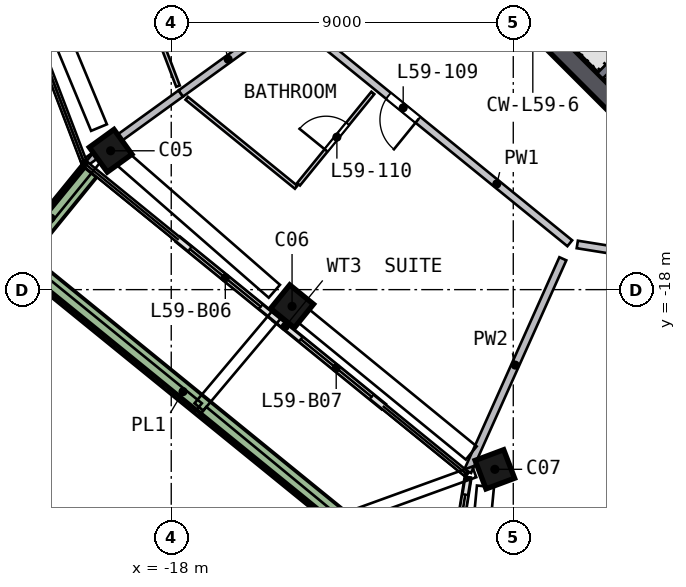
"""IFC4 building model, lengths in metres.
Left out: names, types, materials, properties, quantities, classifications, styles, units other than length and angle.
Written with IfcOpenShell. Run it as: python <this file> out.ifc"""

import sys

from ifc_helpers import new_model, si_unit, direction, frame, frame_2d, origin, origin_2d, place, context, subcontext, project, spatial, rectangle, extrude, element, fill, save


model = new_model("IFC4")
c1 = context("Model", 3, precision=1e-05, world=origin(), true_north=direction((0.0, 1.0)))
c2 = subcontext(c1, "Body", "Model", "MODEL_VIEW")
j1 = project(units=[si_unit("LENGTHUNIT", "METRE"), si_unit("PLANEANGLEUNIT", "RADIAN")], contexts=[c1])
p1 = place(None, origin())
s1 = spatial("IfcSite", under=j1, at=p1, CompositionType="ELEMENT")
p2 = place(p1, origin())
s2 = spatial("IfcBuilding", under=s1, at=p2, CompositionType="ELEMENT")
p3 = place(p2, frame((0.0, 0.0, 241.0)))
s3 = spatial("IfcBuildingStorey", under=s2, at=p3, CompositionType="ELEMENT", Elevation=241.0)
p4 = place(p3, frame((-19.677, -14.234, 0.0), z_axis=(0.068496241, -0.092975475, 0.993309532), x_axis=(-0.582352668, 0.804692577, 0.115478247)))
e1 = element("IfcColumn", 1, at=p4, inside=s3, PredefinedType="COLUMN", context=c2, shape_type="SweptSolid", body=[
    extrude(rectangle(XDim=0.8, YDim=0.8, at=origin_2d()), origin(), (0.0, 0.0, 1.0), 3.211),
])
p5 = place(p3, frame((-14.927, -18.355, 0.0), z_axis=(0.087836342, -0.070269074, 0.993653377), x_axis=(0.770618179, -0.627292241, -0.112481404)))
e2 = element("IfcColumn", 2, at=p5, inside=s3, PredefinedType="COLUMN", context=c2, shape_type="SweptSolid", body=[
    extrude(rectangle(XDim=0.8, YDim=0.8, at=origin_2d()), origin(), (0.0, 0.0, 1.0), 3.21),
])
p6 = place(p3, frame((-9.615, -22.675, 0.0), z_axis=(0.108159867, -0.044768912, 0.993124961), x_axis=(-0.349087537, 0.933659879, 0.080106937)))
e3 = element("IfcColumn", 3, at=p6, inside=s3, PredefinedType="COLUMN", context=c2, shape_type="SweptSolid", body=[
    extrude(rectangle(XDim=0.8, YDim=0.8, at=origin_2d()), origin(), (0.0, 0.0, 1.0), 3.212),
])
p7 = place(p3, frame((-13.823, -5.622, 0.0), z_axis=(0.0, 0.0, 1.0), x_axis=(0.707106781, -0.707106781, 0.0)))
e4 = element("IfcWall", 4, at=p7, inside=s3, PredefinedType="SHEAR", context=c2, shape_type="SweptSolid", body=[
    extrude(rectangle(XDim=11.598, YDim=0.5, at=frame_2d((5.799, 0.0))), origin(), (0.0, 0.0, 1.0), 3.5),
])
p8 = place(p7, frame((2.099, 0.0, 0.0)))
e5 = element("IfcOpeningElement", 5, at=p8, cuts=e4, PredefinedType="OPENING", context=c2, shape_type="SweptSolid", body=[
    extrude(rectangle(XDim=1.2, YDim=2.1, at=frame_2d((0.6, 1.05))), frame((0.0, 0.26, 0.0), z_axis=(0.0, -1.0, 0.0), x_axis=(1.0, 0.0, 0.0)), (0.0, 0.0, 1.0), 0.52),
])
p9 = place(p3, frame((-17.819, -16.68, 0.0), z_axis=(0.0, 0.0, 1.0), x_axis=(0.775849163, -0.630918438, 0.0)))
e6 = element("IfcWall", 6, at=p9, inside=s3, PredefinedType="SOLIDWALL", context=c2, shape_type="SweptSolid", body=[
    extrude(rectangle(XDim=3.3, YDim=0.15, at=frame_2d((1.65, 0.0))), origin(), (0.0, 0.0, 1.0), 2.525),
])
p10 = place(p9, frame((0.4, 0.0, 0.0)))
e7 = element("IfcOpeningElement", 7, at=p10, cuts=e6, PredefinedType="OPENING", context=c2, shape_type="SweptSolid", body=[
    extrude(rectangle(XDim=2.4, YDim=2.4, at=frame_2d((1.2, 1.2))), frame((0.0, 0.085, 0.0), z_axis=(0.0, -1.0, 0.0), x_axis=(1.0, 0.0, 0.0)), (0.0, 0.0, 1.0), 0.17),
])
p11 = place(p3, frame((-15.258, -18.762, 0.0), z_axis=(0.0, 0.0, 1.0), x_axis=(0.775807944, -0.630969122, 0.0)))
e8 = element("IfcWall", 8, at=p11, inside=s3, PredefinedType="SOLIDWALL", context=c2, shape_type="SweptSolid", body=[
    extrude(rectangle(XDim=3.661, YDim=0.15, at=frame_2d((1.831, 0.0))), origin(), (0.0, 0.0, 1.0), 2.525),
])
p12 = place(p11, frame((0.861, 0.0, 0.0)))
e9 = element("IfcOpeningElement", 9, at=p12, cuts=e8, PredefinedType="OPENING", context=c2, shape_type="SweptSolid", body=[
    extrude(rectangle(XDim=2.4, YDim=2.4, at=frame_2d((1.2, 1.2))), frame((0.0, 0.085, 0.0), z_axis=(0.0, -1.0, 0.0), x_axis=(1.0, 0.0, 0.0)), (0.0, 0.0, 1.0), 0.17),
])
p13 = place(p3, frame((-10.2, -23.002, 0.0), z_axis=(0.0, 0.0, 1.0), x_axis=(-0.158469573, -0.987363861, 0.0)))
e10 = element("IfcWall", 10, at=p13, inside=s3, PredefinedType="SOLIDWALL", context=c2, shape_type="SweptSolid", body=[
    extrude(rectangle(XDim=3.2, YDim=0.15, at=frame_2d((1.6, 0.0))), origin(), (0.0, 0.0, 1.0), 2.525),
])
p14 = place(p13, frame((0.4, 0.0, 0.0)))
e11 = element("IfcOpeningElement", 11, at=p14, cuts=e10, PredefinedType="OPENING", context=c2, shape_type="SweptSolid", body=[
    extrude(rectangle(XDim=2.4, YDim=2.4, at=frame_2d((1.2, 1.2))), frame((0.0, 0.085, 0.0), z_axis=(0.0, -1.0, 0.0), x_axis=(1.0, 0.0, 0.0)), (0.0, 0.0, 1.0), 0.17),
])
p15 = place(p3, frame((-20.155, -14.878, 0.0), z_axis=(0.0, 0.0, 1.0), x_axis=(-0.630957466, -0.775817424, 0.0)))
e12 = element("IfcWall", 12, at=p15, inside=s3, PredefinedType="SOLIDWALL", context=c2, shape_type="SweptSolid", body=[
    extrude(rectangle(XDim=3.199, YDim=0.5, at=frame_2d((1.599, 0.0))), origin(), (0.0, 0.0, 1.0), 0.7),
])
p16 = place(p3, frame((-21.822, -17.323, 0.0), z_axis=(0.0, 0.0, 1.0), x_axis=(0.775830705, -0.630941136, 0.0)))
e13 = element("IfcWall", 13, at=p16, inside=s3, PredefinedType="SOLIDWALL", context=c2, shape_type="SweptSolid", body=[
    extrude(rectangle(XDim=10.653, YDim=0.5, at=frame_2d((5.326, 0.0))), origin(), (0.0, 0.0, 1.0), 0.7),
])
p17 = place(p3, frame((-3.677, -9.334, 0.0), z_axis=(0.0, 0.0, 1.0), x_axis=(-0.707078393, -0.707135168, 0.0)))
e14 = element("IfcWall", 14, at=p17, inside=s3, PredefinedType="SOLIDWALL", context=c2, shape_type="SweptSolid", body=[
    extrude(rectangle(XDim=4.3, YDim=0.2, at=frame_2d((2.15, 0.0))), origin(), (0.0, 0.0, 1.0), 3.19),
])
p18 = place(p3, frame((-7.513, -16.78, 0.0), z_axis=(0.0, 0.0, 1.0), x_axis=(-0.775832995, 0.63093832, 0.0)))
e15 = element("IfcWall", 15, at=p18, inside=s3, PredefinedType="SOLIDWALL", context=c2, shape_type="SweptSolid", body=[
    extrude(rectangle(XDim=9.517, YDim=0.2, at=frame_2d((4.758, 0.0))), origin(), (0.0, 0.0, 1.0), 3.19),
])
p19 = place(p18, frame((5.15, 0.0, 0.0)))
e16 = element("IfcOpeningElement", 16, at=p19, cuts=e15, PredefinedType="OPENING", context=c2, shape_type="SweptSolid", body=[
    extrude(rectangle(XDim=1.0, YDim=2.1, at=frame_2d((0.5, 1.05))), frame((0.0, 0.11, 0.0), z_axis=(0.0, -1.0, 0.0), x_axis=(1.0, 0.0, 0.0)), (0.0, 0.0, 1.0), 0.22),
])
p20 = place(p3, frame((1.883, -18.288, 0.0), z_axis=(0.0, 0.0, 1.0), x_axis=(-0.987356604, 0.158514786, 0.0)))
e17 = element("IfcWall", 17, at=p20, inside=s3, PredefinedType="SOLIDWALL", context=c2, shape_type="SweptSolid", body=[
    extrude(rectangle(XDim=9.316, YDim=0.2, at=frame_2d((4.658, 0.0))), origin(), (0.0, 0.0, 1.0), 3.19),
])
p21 = place(p20, frame((3.833, 0.0, 0.0)))
e18 = element("IfcOpeningElement", 18, at=p21, cuts=e17, PredefinedType="OPENING", context=c2, shape_type="SweptSolid", body=[
    extrude(rectangle(XDim=1.8, YDim=2.1, at=frame_2d((0.9, 1.05))), frame((0.0, 0.11, 0.0), z_axis=(0.0, -1.0, 0.0), x_axis=(1.0, 0.0, 0.0)), (0.0, 0.0, 1.0), 0.22),
])
p22 = place(p3, frame((-17.748, -12.838, 0.0), z_axis=(0.0, 0.0, 1.0), x_axis=(-0.810251826, -0.586081888, 0.0)))
e19 = element("IfcWall", 19, at=p22, inside=s3, PredefinedType="SOLIDWALL", context=c2, shape_type="SweptSolid", body=[
    extrude(rectangle(XDim=3.059, YDim=0.2, at=frame_2d((1.53, 0.0))), origin(), (0.0, 0.0, 1.0), 3.19),
])
p23 = place(p3, frame((-15.259, -11.037, 0.0), z_axis=(0.0, 0.0, 1.0), x_axis=(-0.810234847, -0.58610536, 0.0)))
e20 = element("IfcWall", 20, at=p23, inside=s3, PredefinedType="SOLIDWALL", context=c2, shape_type="SweptSolid", body=[
    extrude(rectangle(XDim=3.073, YDim=0.2, at=frame_2d((1.536, 0.0))), origin(), (0.0, 0.0, 1.0), 3.19),
])
p24 = place(p3, frame((-10.201, -22.784, 0.0), z_axis=(0.0, 0.0, 1.0), x_axis=(0.408615729, 0.912706517, 0.0)))
e21 = element("IfcWall", 21, at=p24, inside=s3, PredefinedType="SOLIDWALL", context=c2, shape_type="SweptSolid", body=[
    extrude(rectangle(XDim=6.132, YDim=0.2, at=frame_2d((3.066, 0.0))), origin(), (0.0, 0.0, 1.0), 3.19),
])
p25 = place(p3, frame((-19.142, -9.184, 0.0), z_axis=(0.0, 0.0, 1.0), x_axis=(0.356376272, -0.934342524, 0.0)))
e22 = element("IfcWall", 22, at=p25, inside=s3, PredefinedType="PARTITIONING", context=c2, shape_type="SweptSolid", body=[
    extrude(rectangle(XDim=3.704, YDim=0.1, at=frame_2d((1.852, 0.0))), origin(), (0.0, 0.0, 1.0), 3.19),
])
p26 = place(p3, frame((-14.714, -15.306, 0.0), z_axis=(0.0, 0.0, 1.0), x_axis=(-0.775818108, 0.630956625, 0.0)))
e23 = element("IfcWall", 23, at=p26, inside=s3, PredefinedType="PARTITIONING", context=c2, shape_type="SweptSolid", body=[
    extrude(rectangle(XDim=3.711, YDim=0.1, at=frame_2d((1.855, 0.0))), origin(), (0.0, 0.0, 1.0), 3.19),
])
p27 = place(p3, frame((-14.651, -15.228, 0.0), z_axis=(0.0, 0.0, 1.0), x_axis=(0.630936464, 0.775834504, 0.0)))
e24 = element("IfcWall", 24, at=p27, inside=s3, PredefinedType="PARTITIONING", context=c2, shape_type="SweptSolid", body=[
    extrude(rectangle(XDim=3.1, YDim=0.1, at=frame_2d((1.55, 0.0))), origin(), (0.0, 0.0, 1.0), 3.19),
])
p28 = place(p27, frame((1.15, 0.0, 0.0)))
e25 = element("IfcOpeningElement", 25, at=p28, cuts=e24, PredefinedType="OPENING", context=c2, shape_type="SweptSolid", body=[
    extrude(rectangle(XDim=0.9, YDim=2.1, at=frame_2d((0.45, 1.05))), frame((0.0, 0.06, 0.0), z_axis=(0.0, -1.0, 0.0), x_axis=(1.0, 0.0, 0.0)), (0.0, 0.0, 1.0), 0.12),
])
p29 = place(p10, origin())
e26 = element("IfcDoor", 26, at=p29, inside=s3, OperationType="SLIDING_TO_RIGHT", PredefinedType="DOOR", context=c2, shape_type="SweptSolid", body=[
    extrude(rectangle(XDim=2.4, YDim=2.4, at=frame_2d((1.2, 1.2))), frame((0.0, 0.025, 0.0), z_axis=(0.0, -1.0, 0.0), x_axis=(1.0, 0.0, 0.0)), (0.0, 0.0, 1.0), 0.05),
])
fill(e7, e26)
p30 = place(p12, origin())
e27 = element("IfcDoor", 27, at=p30, inside=s3, OperationType="SLIDING_TO_LEFT", PredefinedType="DOOR", context=c2, shape_type="SweptSolid", body=[
    extrude(rectangle(XDim=2.4, YDim=2.4, at=frame_2d((1.2, 1.2))), frame((0.0, 0.025, 0.0), z_axis=(0.0, -1.0, 0.0), x_axis=(1.0, 0.0, 0.0)), (0.0, 0.0, 1.0), 0.05),
])
fill(e9, e27)
p31 = place(p14, origin())
e28 = element("IfcDoor", 28, at=p31, inside=s3, OperationType="SLIDING_TO_LEFT", PredefinedType="DOOR", context=c2, shape_type="SweptSolid", body=[
    extrude(rectangle(XDim=2.4, YDim=2.4, at=frame_2d((1.2, 1.2))), frame((0.0, 0.025, 0.0), z_axis=(0.0, -1.0, 0.0), x_axis=(1.0, 0.0, 0.0)), (0.0, 0.0, 1.0), 0.05),
])
fill(e11, e28)
p32 = place(p19, origin())
e29 = element("IfcDoor", 29, at=p32, inside=s3, OperationType="SINGLE_SWING_LEFT", PredefinedType="DOOR", context=c2, shape_type="SweptSolid", body=[
    extrude(rectangle(XDim=1.0, YDim=2.1, at=frame_2d((0.5, 1.05))), frame((0.0, 0.025, 0.0), z_axis=(0.0, -1.0, 0.0), x_axis=(1.0, 0.0, 0.0)), (0.0, 0.0, 1.0), 0.05),
])
fill(e16, e29)
p33 = place(p28, origin())
e30 = element("IfcDoor", 30, at=p33, inside=s3, OperationType="SINGLE_SWING_LEFT", PredefinedType="DOOR", context=c2, shape_type="SweptSolid", body=[
    extrude(rectangle(XDim=0.9, YDim=2.1, at=frame_2d((0.45, 1.05))), frame((0.0, 0.025, 0.0), z_axis=(0.0, -1.0, 0.0), x_axis=(1.0, 0.0, 0.0)), (0.0, 0.0, 1.0), 0.05),
])
fill(e25, e30)
save(model, sys.argv[1])
